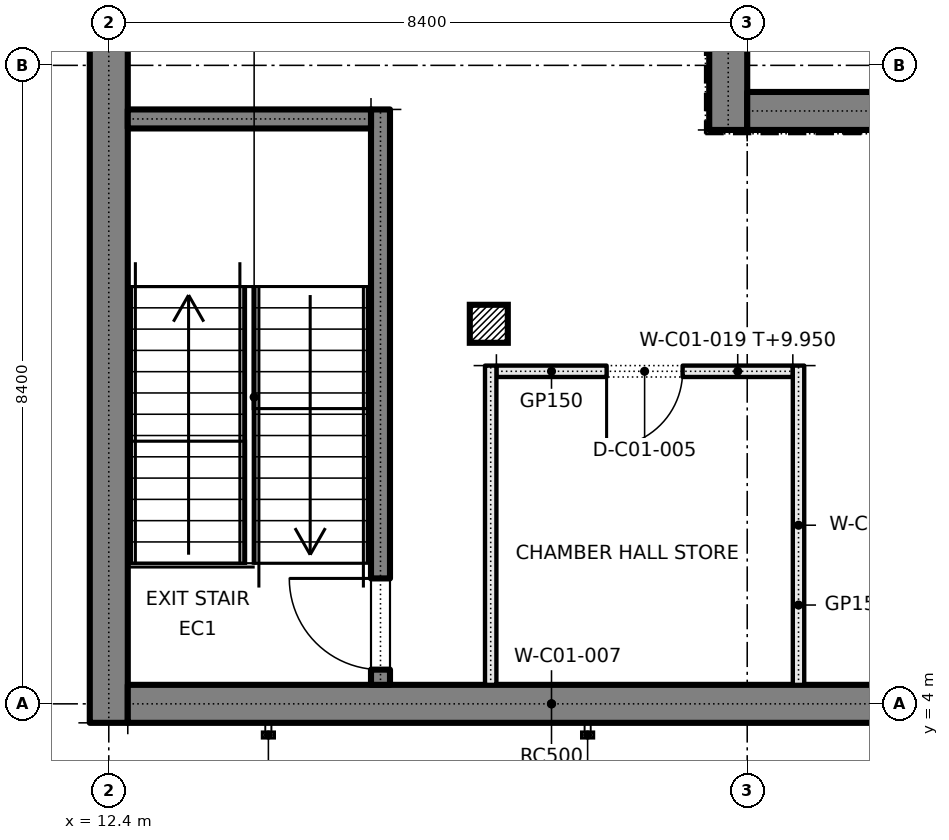
"""IFC4 building model, lengths in metres.
Left out: names, types, materials, properties, quantities, classifications, styles, units other than length and angle.
Written with IfcOpenShell. Run it as: python <this file> out.ifc"""

import sys

from ifc_helpers import new_model, si_unit, direction, frame, frame_2d, origin, origin_2d, place, context, subcontext, project, spatial, rectangle, extrude, element, fill, save


model = new_model("IFC4")
c1 = context("Model", 3, precision=1e-05, world=origin(), true_north=direction((0.0, 1.0)))
c2 = subcontext(c1, "Body", "Model", "MODEL_VIEW")
j1 = project(units=[si_unit("LENGTHUNIT", "METRE"), si_unit("PLANEANGLEUNIT", "RADIAN")], contexts=[c1])
p1 = place(None, origin())
s1 = spatial("IfcSite", under=j1, at=p1, CompositionType="ELEMENT")
p2 = place(p1, origin())
s2 = spatial("IfcBuilding", under=s1, at=p2, CompositionType="ELEMENT")
p3 = place(p2, frame((0.0, 0.0, 5.4)))
s3 = spatial("IfcBuildingStorey", under=s2, at=p3, CompositionType="ELEMENT", Elevation=5.4)
p4 = place(p3, frame((12.4, 3.75, 0.0), z_axis=(0.0, 0.0, 1.0), x_axis=(0.0, 1.0, 0.0)))
e1 = element("IfcWall", 1, at=p4, inside=s3, PredefinedType="SOLIDWALL", context=c2, shape_type="SweptSolid", body=[
    extrude(rectangle(XDim=42.5, YDim=0.5, at=frame_2d((21.25, 0.0))), origin(), (0.0, 0.0, 1.0), 4.8),
])
p5 = place(p3, frame((12.65, 4.0, 0.0), z_axis=(0.0, 0.0, 1.0), x_axis=(1.0, 0.0, 0.0)))
e2 = element("IfcWall", 2, at=p5, inside=s3, PredefinedType="SOLIDWALL", context=c2, shape_type="SweptSolid", body=[
    extrude(rectangle(XDim=33.1, YDim=0.5, at=frame_2d((16.55, 0.0))), origin(), (0.0, 0.0, 1.0), 4.8),
])
p6 = place(p5, frame((11.15, 0.0, 0.9)))
e3 = element("IfcOpeningElement", 3, at=p6, cuts=e2, PredefinedType="OPENING", context=c2, shape_type="SweptSolid", body=[
    extrude(rectangle(XDim=2.4, YDim=2.4, at=frame_2d((1.2, 1.2))), frame((0.0, 0.26, 0.0), z_axis=(0.0, -1.0, 0.0), x_axis=(1.0, 0.0, 0.0)), (0.0, 0.0, 1.0), 0.52),
])
p7 = place(p5, frame((15.35, 0.0, 0.9)))
e4 = element("IfcOpeningElement", 4, at=p7, cuts=e2, PredefinedType="OPENING", context=c2, shape_type="SweptSolid", body=[
    extrude(rectangle(XDim=2.4, YDim=2.4, at=frame_2d((1.2, 1.2))), frame((0.0, 0.26, 0.0), z_axis=(0.0, -1.0, 0.0), x_axis=(1.0, 0.0, 0.0)), (0.0, 0.0, 1.0), 0.52),
])
p8 = place(p5, frame((19.55, 0.0, 0.9)))
e5 = element("IfcOpeningElement", 5, at=p8, cuts=e2, PredefinedType="OPENING", context=c2, shape_type="SweptSolid", body=[
    extrude(rectangle(XDim=2.4, YDim=2.4, at=frame_2d((1.2, 1.2))), frame((0.0, 0.26, 0.0), z_axis=(0.0, -1.0, 0.0), x_axis=(1.0, 0.0, 0.0)), (0.0, 0.0, 1.0), 0.52),
])
p9 = place(p5, frame((23.75, 0.0, 0.9)))
e6 = element("IfcOpeningElement", 6, at=p9, cuts=e2, PredefinedType="OPENING", context=c2, shape_type="SweptSolid", body=[
    extrude(rectangle(XDim=2.4, YDim=2.4, at=frame_2d((1.2, 1.2))), frame((0.0, 0.26, 0.0), z_axis=(0.0, -1.0, 0.0), x_axis=(1.0, 0.0, 0.0)), (0.0, 0.0, 1.0), 0.52),
])
p10 = place(p5, frame((27.95, 0.0, 0.9)))
e7 = element("IfcOpeningElement", 7, at=p10, cuts=e2, PredefinedType="OPENING", context=c2, shape_type="SweptSolid", body=[
    extrude(rectangle(XDim=2.4, YDim=2.4, at=frame_2d((1.2, 1.2))), frame((0.0, 0.26, 0.0), z_axis=(0.0, -1.0, 0.0), x_axis=(1.0, 0.0, 0.0)), (0.0, 0.0, 1.0), 0.52),
])
p11 = place(p3, frame((20.55, 11.55, 0.0), z_axis=(0.0, 0.0, 1.0), x_axis=(0.0, 1.0, 0.0)))
e8 = element("IfcWall", 8, at=p11, inside=s3, PredefinedType="SOLIDWALL", context=c2, shape_type="SweptSolid", body=[
    extrude(rectangle(XDim=29.0, YDim=0.5, at=frame_2d((14.5, 0.0))), origin(), (0.0, 0.0, 1.0), 4.8),
])
p12 = place(p11, frame((5.65, 0.0, 0.0)))
e9 = element("IfcOpeningElement", 9, at=p12, cuts=e8, PredefinedType="OPENING", context=c2, shape_type="SweptSolid", body=[
    extrude(rectangle(XDim=1.8, YDim=2.1, at=frame_2d((0.9, 1.05))), frame((0.0, 0.26, 0.0), z_axis=(0.0, -1.0, 0.0), x_axis=(1.0, 0.0, 0.0)), (0.0, 0.0, 1.0), 0.52),
])
p13 = place(p3, frame((20.8, 11.8, 0.0), z_axis=(0.0, 0.0, 1.0), x_axis=(1.0, 0.0, 0.0)))
e10 = element("IfcWall", 10, at=p13, inside=s3, PredefinedType="SOLIDWALL", context=c2, shape_type="SweptSolid", body=[
    extrude(rectangle(XDim=16.8, YDim=0.5, at=frame_2d((8.4, 0.0))), origin(), (0.0, 0.0, 1.0), 4.8),
])
p14 = place(p3, frame((15.975, 4.25, 0.0), z_axis=(0.0, 0.0, 1.0), x_axis=(0.0, 1.0, 0.0)))
e11 = element("IfcWall", 11, at=p14, inside=s3, PredefinedType="SOLIDWALL", context=c2, shape_type="SweptSolid", body=[
    extrude(rectangle(XDim=7.57, YDim=0.25, at=frame_2d((3.785, 0.0))), origin(), (0.0, 0.0, 1.0), 4.8),
])
p15 = place(p14, frame((0.2, 0.0, 0.0)))
e12 = element("IfcOpeningElement", 12, at=p15, cuts=e11, PredefinedType="OPENING", context=c2, shape_type="SweptSolid", body=[
    extrude(rectangle(XDim=1.2, YDim=2.1, at=frame_2d((0.6, 1.05))), frame((0.0, 0.135, 0.0), z_axis=(0.0, -1.0, 0.0), x_axis=(1.0, 0.0, 0.0)), (0.0, 0.0, 1.0), 0.27),
])
p16 = place(p3, frame((12.65, 11.695, 0.0), z_axis=(0.0, 0.0, 1.0), x_axis=(1.0, 0.0, 0.0)))
e13 = element("IfcWall", 13, at=p16, inside=s3, PredefinedType="SOLIDWALL", context=c2, shape_type="SweptSolid", body=[
    extrude(rectangle(XDim=3.2, YDim=0.25, at=frame_2d((1.6, 0.0))), origin(), (0.0, 0.0, 1.0), 4.8),
])
p17 = place(p3, frame((17.4, 9.0, 0.0), z_axis=(0.0, 0.0, 1.0), x_axis=(1.0, 0.0, 0.0)))
e14 = element("IfcColumn", 14, at=p17, inside=s3, PredefinedType="COLUMN", context=c2, shape_type="SweptSolid", body=[
    extrude(rectangle(XDim=0.5, YDim=0.5, at=origin_2d()), origin(), (0.0, 0.0, 1.0), 4.8),
])
p18 = place(p3, frame((17.5, 8.375, 0.0), z_axis=(0.0, 0.0, 1.0), x_axis=(1.0, 0.0, 0.0)))
e15 = element("IfcWall", 15, at=p18, inside=s3, PredefinedType="PARTITIONING", context=c2, shape_type="SweptSolid", body=[
    extrude(rectangle(XDim=3.9, YDim=0.15, at=frame_2d((1.95, 0.0))), origin(), (0.0, 0.0, 1.0), 4.55),
])
p19 = place(p18, frame((1.45, 0.0, 0.0)))
e16 = element("IfcOpeningElement", 16, at=p19, cuts=e15, PredefinedType="OPENING", context=c2, shape_type="SweptSolid", body=[
    extrude(rectangle(XDim=1.0, YDim=2.1, at=frame_2d((0.5, 1.05))), frame((0.0, 0.085, 0.0), z_axis=(0.0, -1.0, 0.0), x_axis=(1.0, 0.0, 0.0)), (0.0, 0.0, 1.0), 0.17),
])
for number, where, z_axis, x_axis in (
    (17, (17.425, 4.25, 0.0), (0.0, 0.0, 1.0), (0.0, 1.0, 0.0)),
    (18, (21.475, 4.25, 0.0), (0.0, 0.0, 1.0), (0.0, 1.0, 0.0)),
):
    element("IfcWall", number, at=place(p3, frame(where, z_axis=z_axis, x_axis=x_axis)), inside=s3, PredefinedType="PARTITIONING", context=c2, shape_type="SweptSolid", body=[
        extrude(rectangle(XDim=4.2, YDim=0.15, at=frame_2d((2.1, 0.0))), origin(), (0.0, 0.0, 1.0), 4.55),
    ])
p20 = place(p19, frame((1.0, 0.0, 0.0), z_axis=(0.0, 0.0, 1.0), x_axis=(-1.0, 0.0, 0.0)))
e19 = element("IfcDoor", 19, at=p20, inside=s3, OperationType="SINGLE_SWING_RIGHT", PredefinedType="DOOR", context=c2, shape_type="SweptSolid", body=[
    extrude(rectangle(XDim=1.0, YDim=2.1, at=frame_2d((0.5, 1.05))), frame((0.0, 0.025, 0.0), z_axis=(0.0, -1.0, 0.0), x_axis=(1.0, 0.0, 0.0)), (0.0, 0.0, 1.0), 0.05),
])
fill(e16, e19)
p21 = place(p15, origin())
e20 = element("IfcDoor", 20, at=p21, inside=s3, OperationType="SINGLE_SWING_RIGHT", PredefinedType="DOOR", context=c2, shape_type="SweptSolid", body=[
    extrude(rectangle(XDim=1.2, YDim=2.1, at=frame_2d((0.6, 1.05))), frame((0.0, 0.025, 0.0), z_axis=(0.0, -1.0, 0.0), x_axis=(1.0, 0.0, 0.0)), (0.0, 0.0, 1.0), 0.05),
])
fill(e12, e20)
save(model, sys.argv[1])
